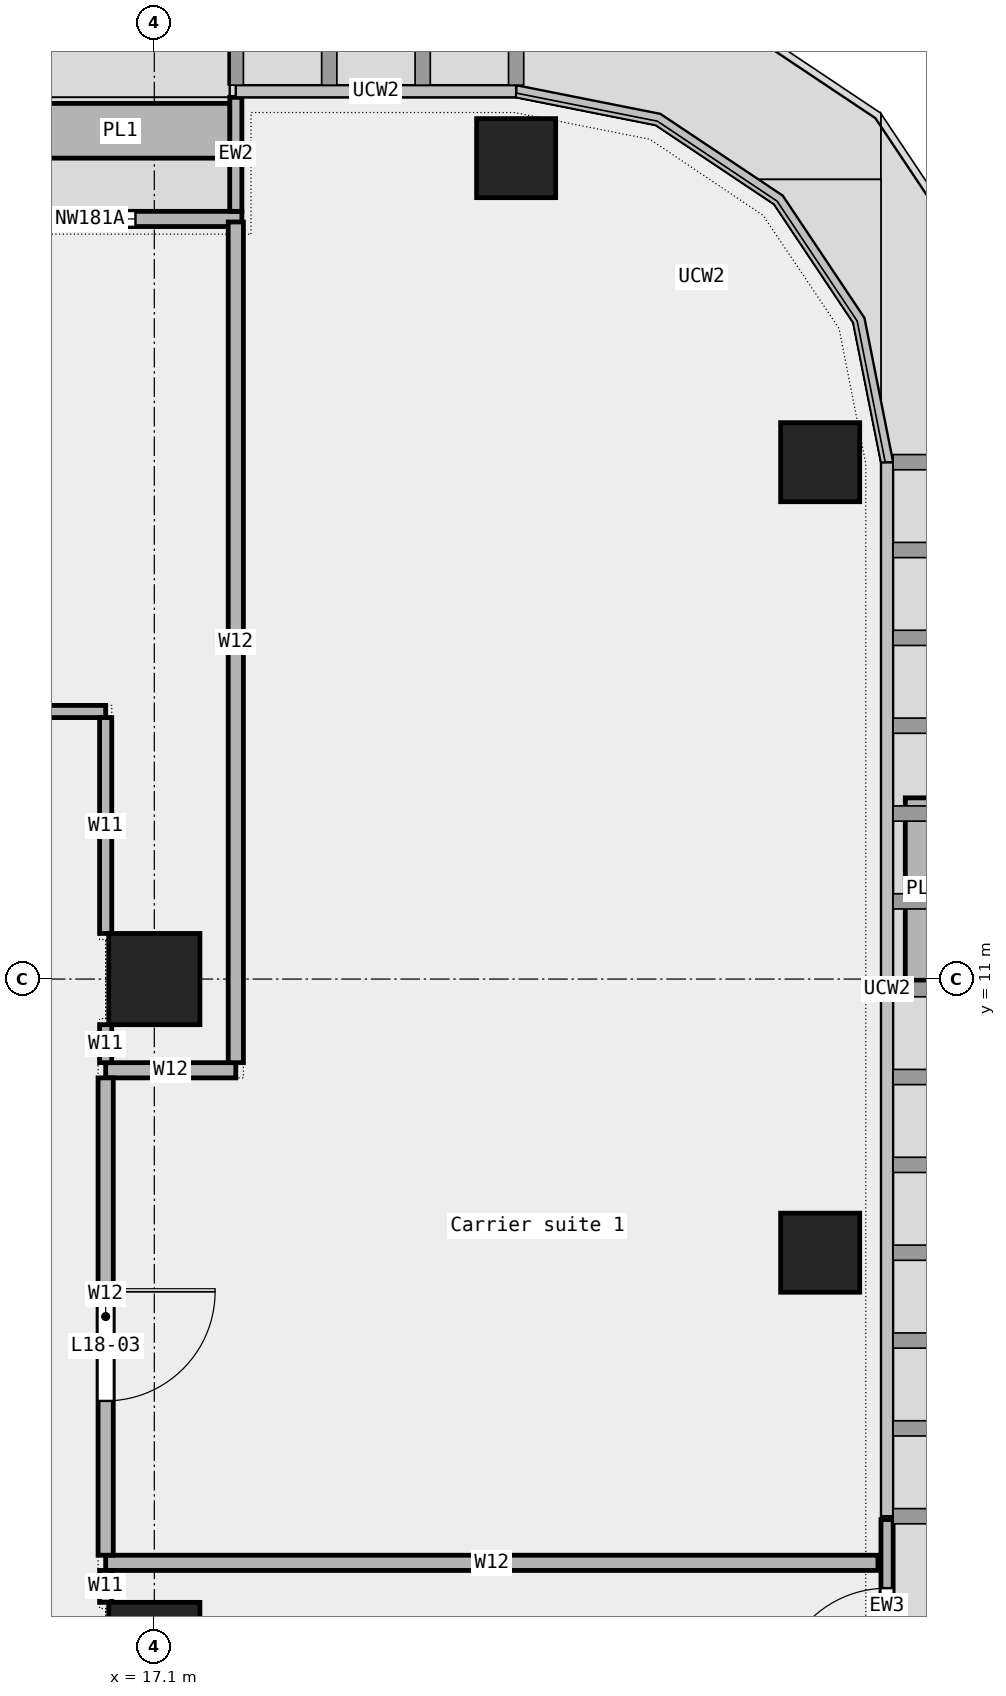
"""IFC4 building model, lengths in metres.
Left out: names, types, materials, properties, quantities, classifications, styles, units other than length and angle.
Written with IfcOpenShell. Run it as: python <this file> out.ifc"""

import sys

from ifc_helpers import new_model, si_unit, direction, frame, frame_2d, origin, origin_2d, place, context, subcontext, project, spatial, rectangle, extrude, element, fill, save


model = new_model("IFC4")
c1 = context("Model", 3, precision=1e-05, world=origin(), true_north=direction((0.0, 1.0)))
c2 = subcontext(c1, "Body", "Model", "MODEL_VIEW")
j1 = project(units=[si_unit("LENGTHUNIT", "METRE"), si_unit("PLANEANGLEUNIT", "RADIAN")], contexts=[c1])
p1 = place(None, origin())
s1 = spatial("IfcSite", under=j1, at=p1, CompositionType="ELEMENT")
p2 = place(p1, origin())
s2 = spatial("IfcBuilding", under=s1, at=p2, CompositionType="ELEMENT")
p3 = place(p2, frame((0.0, 0.0, 94.6)))
s3 = spatial("IfcBuildingStorey", under=s2, at=p3, CompositionType="ELEMENT", Elevation=94.6)
for number, where, z_axis, x_axis in (
    (1, (28.05, 6.5, 0.0), (0.0, 0.0, 1.0), (1.0, 0.0, 0.0)),
    (2, (28.05, 19.5, 0.0), (0.0, 0.0, 1.0), (1.0, 0.0, 0.0)),
    (3, (23.05, 24.5, 0.0), (0.0, 0.0, 1.0), (1.0, 0.0, 0.0)),
):
    element("IfcColumn", number, at=place(p3, frame(where, z_axis=z_axis, x_axis=x_axis)), inside=s3, PredefinedType="COLUMN", context=c2, shape_type="SweptSolid", body=[
        extrude(rectangle(XDim=1.3, YDim=1.3, at=origin_2d()), origin(), (0.0, 0.0, 1.0), 4.05),
    ])
for number, where, z_axis, x_axis in (
    (4, (17.1, 0.0, 0.0), (0.0, 0.0, 1.0), (1.0, 0.0, 0.0)),
    (5, (17.1, 11.0, 0.0), (0.0, 0.0, 1.0), (1.0, 0.0, 0.0)),
):
    element("IfcColumn", number, at=place(p3, frame(where, z_axis=z_axis, x_axis=x_axis)), inside=s3, PredefinedType="COLUMN", context=c2, shape_type="SweptSolid", body=[
        extrude(rectangle(XDim=1.5, YDim=1.5, at=origin_2d()), origin(), (0.0, 0.0, 1.0), 4.05),
    ])
p4 = place(p3, frame((18.54, 23.5, 0.0), z_axis=(0.0, 0.0, 1.0), x_axis=(-1.0, 0.0, 0.0)))
e6 = element("IfcWall", 6, at=p4, inside=s3, PredefinedType="STANDARD", context=c2, shape_type="SweptSolid", body=[
    extrude(rectangle(XDim=14.03, YDim=0.25, at=frame_2d((7.015, 0.0))), origin(), (0.0, 0.0, 1.0), 4.05),
])
p5 = place(p4, frame((1.75, 0.0, 0.45)))
e7 = element("IfcOpeningElement", 7, at=p5, cuts=e6, PredefinedType="OPENING", context=c2, shape_type="SweptSolid", body=[
    extrude(rectangle(XDim=1.5, YDim=3.0, at=frame_2d((0.75, 1.5))), frame((0.0, 0.137, 0.0), z_axis=(0.0, -1.0, 0.0), x_axis=(1.0, 0.0, 0.0)), (0.0, 0.0, 1.0), 0.274),
])
p6 = place(p4, frame((4.25, 0.0, 0.0)))
e8 = element("IfcOpeningElement", 8, at=p6, cuts=e6, PredefinedType="OPENING", context=c2, shape_type="SweptSolid", body=[
    extrude(rectangle(XDim=1.8, YDim=2.4, at=frame_2d((0.9, 1.2))), frame((0.0, 0.137, 0.0), z_axis=(0.0, -1.0, 0.0), x_axis=(1.0, 0.0, 0.0)), (0.0, 0.0, 1.0), 0.274),
])
p7 = place(p4, frame((10.75, 0.0, 0.45)))
e9 = element("IfcOpeningElement", 9, at=p7, cuts=e6, PredefinedType="OPENING", context=c2, shape_type="SweptSolid", body=[
    extrude(rectangle(XDim=1.5, YDim=3.0, at=frame_2d((0.75, 1.5))), frame((0.0, 0.137, 0.0), z_axis=(0.0, -1.0, 0.0), x_axis=(1.0, 0.0, 0.0)), (0.0, 0.0, 1.0), 0.274),
])
p8 = place(p3, frame((18.44, 25.5, 0.0), z_axis=(0.0, 0.0, 1.0), x_axis=(0.0, -1.0, 0.0)))
e10 = element("IfcWall", 10, at=p8, inside=s3, PredefinedType="STANDARD", context=c2, shape_type="SweptSolid", body=[
    extrude(rectangle(XDim=1.875, YDim=0.2, at=frame_2d((0.938, 0.0))), origin(), (0.0, 0.0, 1.0), 4.05),
])
p9 = place(p3, frame((18.34, 24.95, 0.0), z_axis=(0.0, 0.0, 1.0), x_axis=(-1.0, 0.0, 0.0)))
e11 = element("IfcWall", 11, at=p9, inside=s3, PredefinedType="STANDARD", context=c2, shape_type="SweptSolid", body=[
    extrude(rectangle(XDim=3.6, YDim=0.9, at=frame_2d((1.8, 0.0))), origin(), (0.0, 0.0, 1.0), 0.7),
])
p10 = place(p3, frame((29.15, -2.112, 0.0), z_axis=(0.0, 0.0, 1.0), x_axis=(0.0, 1.0, 0.0)))
e12 = element("IfcWall", 12, at=p10, inside=s3, PredefinedType="STANDARD", context=c2, shape_type="SweptSolid", body=[
    extrude(rectangle(XDim=4.223, YDim=0.2, at=frame_2d((2.112, 0.0))), origin(), (0.0, 0.0, 1.0), 4.05),
])
p11 = place(p10, frame((1.295, 0.0, 0.0)))
e13 = element("IfcOpeningElement", 13, at=p11, cuts=e12, PredefinedType="OPENING", context=c2, shape_type="SweptSolid", body=[
    extrude(rectangle(XDim=1.8, YDim=2.4, at=frame_2d((0.9, 1.2))), frame((0.0, 0.112, 0.0), z_axis=(0.0, -1.0, 0.0), x_axis=(1.0, 0.0, 0.0)), (0.0, 0.0, 1.0), 0.224),
])
p12 = place(p3, frame((29.75, 10.98, 0.0), z_axis=(0.0, 0.0, 1.0), x_axis=(0.0, 1.0, 0.0)))
e14 = element("IfcWall", 14, at=p12, inside=s3, PredefinedType="STANDARD", context=c2, shape_type="SweptSolid", body=[
    extrude(rectangle(XDim=3.0, YDim=0.6, at=frame_2d((1.5, 0.0))), origin(), (0.0, 0.0, 1.0), 0.7),
])
p13 = place(p3, frame((16.3, 1.4, 0.0), z_axis=(0.0, 0.0, 1.0), x_axis=(1.0, 0.0, 0.0)))
e15 = element("IfcWall", 15, at=p13, inside=s3, PredefinedType="PARTITIONING", context=c2, shape_type="SweptSolid", body=[
    extrude(rectangle(XDim=12.7, YDim=0.25, at=frame_2d((6.35, 0.0))), origin(), (0.0, 0.0, 1.0), 4.05),
])
p14 = place(p3, frame((16.3, 9.5, 0.0), z_axis=(0.0, 0.0, 1.0), x_axis=(1.0, 0.0, 0.0)))
e16 = element("IfcWall", 16, at=p14, inside=s3, PredefinedType="PARTITIONING", context=c2, shape_type="SweptSolid", body=[
    extrude(rectangle(XDim=2.14, YDim=0.25, at=frame_2d((1.07, 0.0))), origin(), (0.0, 0.0, 1.0), 4.05),
])
p15 = place(p3, frame((1.0, 15.4, 0.0), z_axis=(0.0, 0.0, 1.0), x_axis=(1.0, 0.0, 0.0)))
e17 = element("IfcWall", 17, at=p15, inside=s3, PredefinedType="PARTITIONING", context=c2, shape_type="SweptSolid", body=[
    extrude(rectangle(XDim=15.3, YDim=0.2, at=frame_2d((7.65, 0.0))), origin(), (0.0, 0.0, 1.0), 4.05),
])
p16 = place(p15, frame((1.355, 0.0, 0.0)))
e18 = element("IfcOpeningElement", 18, at=p16, cuts=e17, PredefinedType="OPENING", context=c2, shape_type="SweptSolid", body=[
    extrude(rectangle(XDim=0.9, YDim=2.1, at=frame_2d((0.45, 1.05))), frame((0.0, 0.112, 0.0), z_axis=(0.0, -1.0, 0.0), x_axis=(1.0, 0.0, 0.0)), (0.0, 0.0, 1.0), 0.224),
])
p17 = place(p15, frame((8.705, 0.0, 0.0)))
e19 = element("IfcOpeningElement", 19, at=p17, cuts=e17, PredefinedType="OPENING", context=c2, shape_type="SweptSolid", body=[
    extrude(rectangle(XDim=1.5, YDim=2.1, at=frame_2d((0.75, 1.05))), frame((0.0, 0.112, 0.0), z_axis=(0.0, -1.0, 0.0), x_axis=(1.0, 0.0, 0.0)), (0.0, 0.0, 1.0), 0.224),
])
p18 = place(p3, frame((16.3, 0.75, 0.0), z_axis=(0.0, 0.0, 1.0), x_axis=(0.0, 1.0, 0.0)))
e20 = element("IfcWall", 20, at=p18, inside=s3, PredefinedType="PARTITIONING", context=c2, shape_type="SweptSolid", body=[
    extrude(rectangle(XDim=0.525, YDim=0.2, at=frame_2d((0.262, 0.0))), origin(), (0.0, 0.0, 1.0), 4.05),
])
p19 = place(p3, frame((16.3, 9.625, 0.0), z_axis=(0.0, 0.0, 1.0), x_axis=(0.0, 1.0, 0.0)))
e21 = element("IfcWall", 21, at=p19, inside=s3, PredefinedType="PARTITIONING", context=c2, shape_type="SweptSolid", body=[
    extrude(rectangle(XDim=0.625, YDim=0.2, at=frame_2d((0.312, 0.0))), origin(), (0.0, 0.0, 1.0), 4.05),
])
p20 = place(p3, frame((16.3, 11.75, 0.0), z_axis=(0.0, 0.0, 1.0), x_axis=(0.0, 1.0, 0.0)))
e22 = element("IfcWall", 22, at=p20, inside=s3, PredefinedType="PARTITIONING", context=c2, shape_type="SweptSolid", body=[
    extrude(rectangle(XDim=3.55, YDim=0.2, at=frame_2d((1.775, 0.0))), origin(), (0.0, 0.0, 1.0), 4.05),
])
p21 = place(p3, frame((16.3, 1.525, 0.0), z_axis=(0.0, 0.0, 1.0), x_axis=(0.0, 1.0, 0.0)))
e23 = element("IfcWall", 23, at=p21, inside=s3, PredefinedType="PARTITIONING", context=c2, shape_type="SweptSolid", body=[
    extrude(rectangle(XDim=7.85, YDim=0.25, at=frame_2d((3.925, 0.0))), origin(), (0.0, 0.0, 1.0), 4.05),
])
p22 = place(p21, frame((2.538, 0.0, 0.0)))
e24 = element("IfcOpeningElement", 24, at=p22, cuts=e23, PredefinedType="OPENING", context=c2, shape_type="SweptSolid", body=[
    extrude(rectangle(XDim=1.8, YDim=2.1, at=frame_2d((0.9, 1.05))), frame((0.0, 0.137, 0.0), z_axis=(0.0, -1.0, 0.0), x_axis=(1.0, 0.0, 0.0)), (0.0, 0.0, 1.0), 0.274),
])
p23 = place(p3, frame((18.44, 9.625, 0.0), z_axis=(0.0, 0.0, 1.0), x_axis=(0.0, 1.0, 0.0)))
e25 = element("IfcWall", 25, at=p23, inside=s3, PredefinedType="PARTITIONING", context=c2, shape_type="SweptSolid", body=[
    extrude(rectangle(XDim=13.825, YDim=0.25, at=frame_2d((6.913, 0.0))), origin(), (0.0, 0.0, 1.0), 4.05),
])
p24 = place(p5, origin())
e26 = element("IfcWindow", 26, at=p24, inside=s3, PartitioningType="SINGLE_PANEL", PredefinedType="WINDOW", context=c2, shape_type="SweptSolid", body=[
    extrude(rectangle(XDim=1.5, YDim=3.0, at=frame_2d((0.75, 1.5))), frame((0.0, 0.03, 0.0), z_axis=(0.0, -1.0, 0.0), x_axis=(1.0, 0.0, 0.0)), (0.0, 0.0, 1.0), 0.06),
])
fill(e7, e26)
p25 = place(p11, origin())
e27 = element("IfcDoor", 27, at=p25, inside=s3, OperationType="DOUBLE_DOOR_SINGLE_SWING", PredefinedType="DOOR", context=c2, shape_type="SweptSolid", body=[
    extrude(rectangle(XDim=1.8, YDim=2.4, at=frame_2d((0.9, 1.2))), frame((0.0, 0.025, 0.0), z_axis=(0.0, -1.0, 0.0), x_axis=(1.0, 0.0, 0.0)), (0.0, 0.0, 1.0), 0.05),
])
fill(e13, e27)
p26 = place(p22, origin())
e28 = element("IfcDoor", 28, at=p26, inside=s3, OperationType="DOUBLE_DOOR_SINGLE_SWING", PredefinedType="DOOR", context=c2, shape_type="SweptSolid", body=[
    extrude(rectangle(XDim=1.8, YDim=2.1, at=frame_2d((0.9, 1.05))), frame((0.0, 0.025, 0.0), z_axis=(0.0, -1.0, 0.0), x_axis=(1.0, 0.0, 0.0)), (0.0, 0.0, 1.0), 0.05),
])
fill(e24, e28)
save(model, sys.argv[1])
